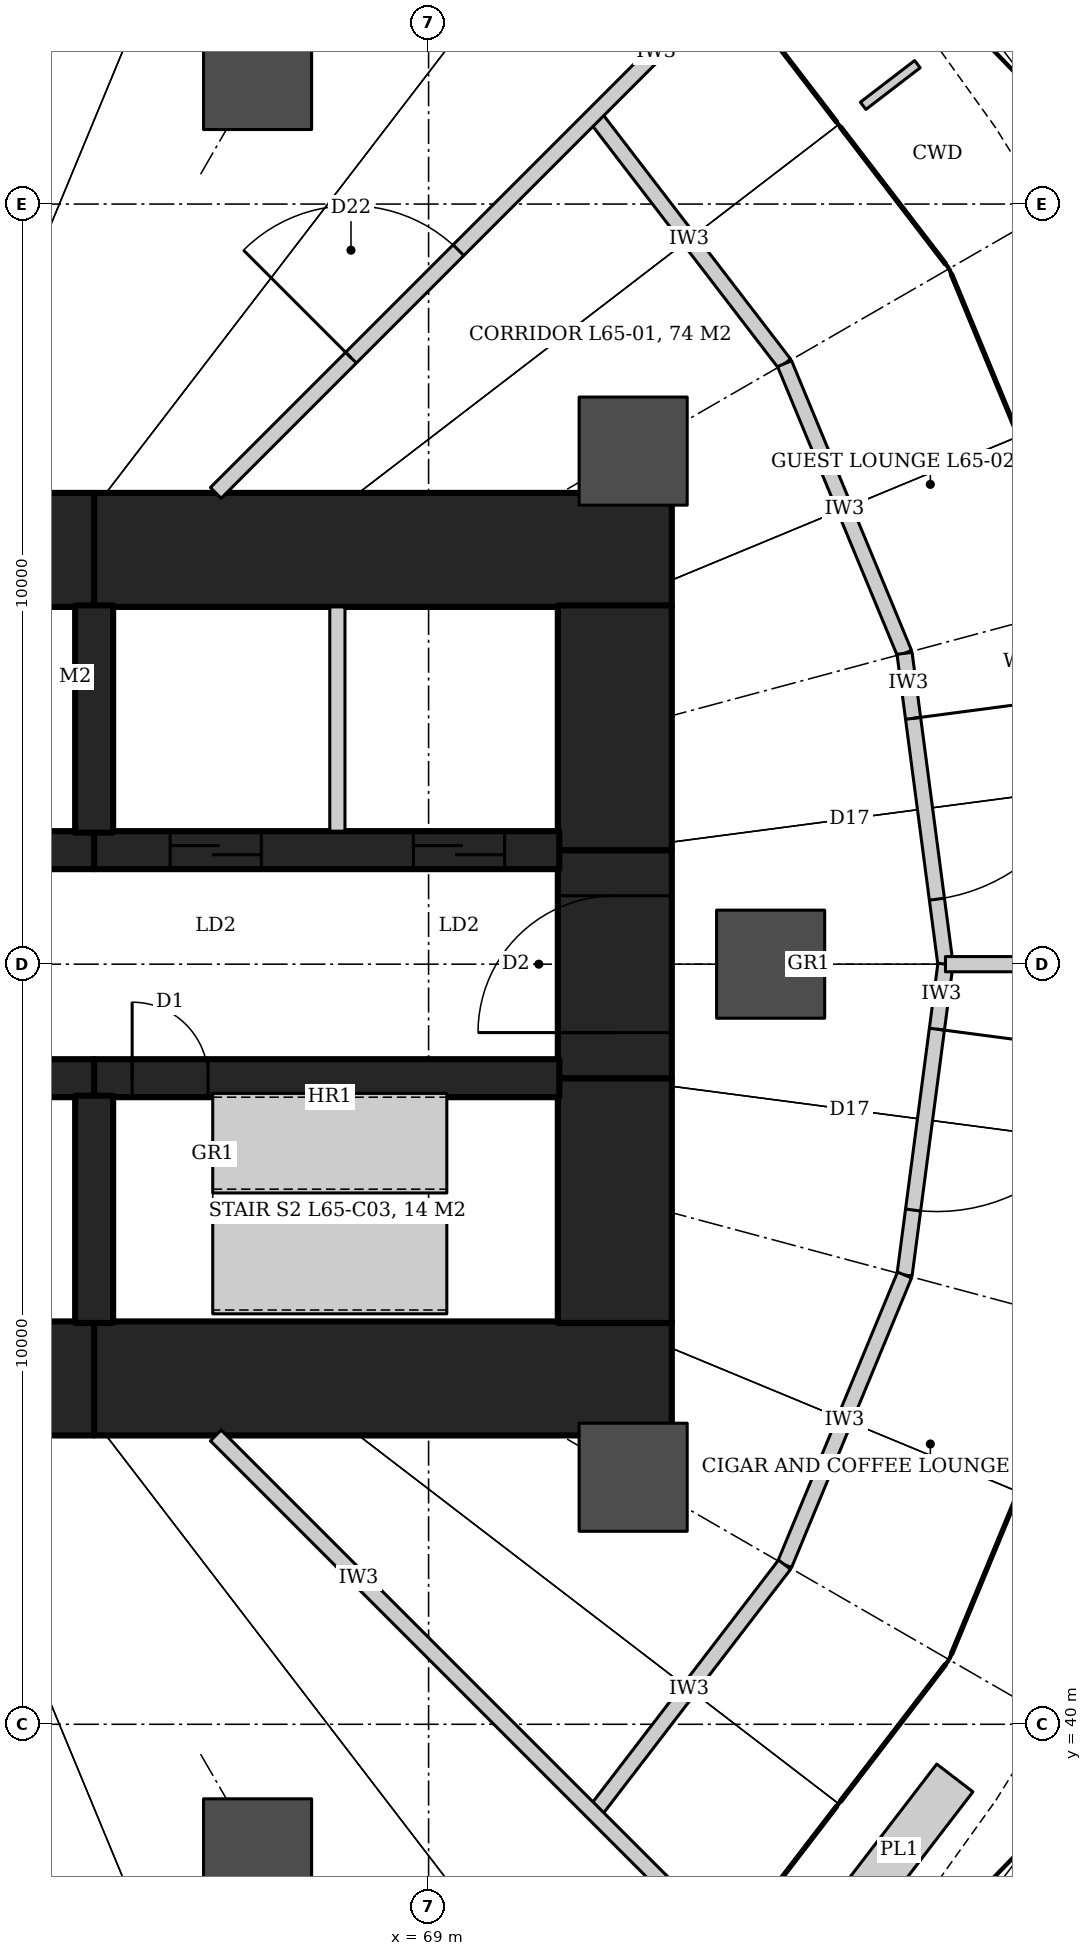
"""IFC4 building model, lengths in metres.
Left out: names, types, materials, properties, quantities, classifications, styles, units other than length and angle.
Written with IfcOpenShell. Run it as: python <this file> out.ifc"""

import sys

from ifc_helpers import new_model, si_unit, direction, frame, frame_2d, origin, origin_2d, place, context, subcontext, project, spatial, rectangle, hollow_circle, extrude, element, fill, save


model = new_model("IFC4")
c1 = context("Model", 3, precision=1e-05, world=origin(), true_north=direction((0.0, 1.0)))
c2 = subcontext(c1, "Body", "Model", "MODEL_VIEW")
j1 = project(units=[si_unit("LENGTHUNIT", "METRE"), si_unit("PLANEANGLEUNIT", "RADIAN")], contexts=[c1])
p1 = place(None, origin())
s1 = spatial("IfcSite", under=j1, at=p1, CompositionType="ELEMENT")
p2 = place(p1, origin())
s2 = spatial("IfcBuilding", under=s1, at=p2, CompositionType="ELEMENT")
p3 = place(p2, frame((0.0, 0.0, 278.0)))
s3 = spatial("IfcBuildingStorey", under=s2, at=p3, CompositionType="ELEMENT", Elevation=278.0)
p4 = place(p3, frame((55.4, 55.45, 0.0), z_axis=(0.0, 0.0, 1.0), x_axis=(1.0, 0.0, 0.0)))
e1 = element("IfcWall", 1, at=p4, inside=s3, PredefinedType="SHEAR", context=c2, shape_type="SweptSolid", body=[
    extrude(rectangle(XDim=9.2, YDim=1.5, at=frame_2d((4.6, 0.0))), origin(), (0.0, 0.0, 1.0), 4.2),
])
p5 = place(p3, frame((64.6, 55.45, 0.0), z_axis=(0.0, 0.0, 1.0), x_axis=(1.0, 0.0, 0.0)))
e2 = element("IfcWall", 2, at=p5, inside=s3, PredefinedType="SHEAR", context=c2, shape_type="SweptSolid", body=[
    extrude(rectangle(XDim=7.6, YDim=1.5, at=frame_2d((3.8, 0.0))), origin(), (0.0, 0.0, 1.0), 4.2),
])
p6 = place(p3, frame((55.4, 44.55, 0.0), z_axis=(0.0, 0.0, 1.0), x_axis=(1.0, 0.0, 0.0)))
e3 = element("IfcWall", 3, at=p6, inside=s3, PredefinedType="SHEAR", context=c2, shape_type="SweptSolid", body=[
    extrude(rectangle(XDim=9.2, YDim=1.5, at=frame_2d((4.6, 0.0))), origin(), (0.0, 0.0, 1.0), 4.2),
])
p7 = place(p3, frame((64.6, 44.55, 0.0), z_axis=(0.0, 0.0, 1.0), x_axis=(1.0, 0.0, 0.0)))
e4 = element("IfcWall", 4, at=p7, inside=s3, PredefinedType="SHEAR", context=c2, shape_type="SweptSolid", body=[
    extrude(rectangle(XDim=7.6, YDim=1.5, at=frame_2d((3.8, 0.0))), origin(), (0.0, 0.0, 1.0), 4.2),
])
p8 = place(p3, frame((71.45, 45.28, 0.0), z_axis=(0.0, 0.0, 1.0), x_axis=(0.0, 1.0, 0.0)))
e5 = element("IfcWall", 5, at=p8, inside=s3, PredefinedType="SHEAR", context=c2, shape_type="SweptSolid", body=[
    extrude(rectangle(XDim=3.22, YDim=1.5, at=frame_2d((1.61, 0.0))), origin(), (0.0, 0.0, 1.0), 4.2),
])
p9 = place(p3, frame((71.45, 48.5, 0.0), z_axis=(0.0, 0.0, 1.0), x_axis=(0.0, 1.0, 0.0)))
e6 = element("IfcWall", 6, at=p9, inside=s3, PredefinedType="SHEAR", context=c2, shape_type="SweptSolid", body=[
    extrude(rectangle(XDim=3.0, YDim=1.5, at=frame_2d((1.5, 0.0))), origin(), (0.0, 0.0, 1.0), 4.2),
])
p10 = place(p9, frame((0.6, 0.0, 0.0)))
e7 = element("IfcOpeningElement", 7, at=p10, cuts=e6, PredefinedType="OPENING", context=c2, shape_type="SweptSolid", body=[
    extrude(rectangle(XDim=1.8, YDim=2.1, at=frame_2d((0.9, 1.05))), frame((0.0, 0.76, 0.0), z_axis=(0.0, -1.0, 0.0), x_axis=(1.0, 0.0, 0.0)), (0.0, 0.0, 1.0), 1.52),
])
p11 = place(p3, frame((71.45, 51.5, 0.0), z_axis=(0.0, 0.0, 1.0), x_axis=(0.0, 1.0, 0.0)))
e8 = element("IfcWall", 8, at=p11, inside=s3, PredefinedType="SHEAR", context=c2, shape_type="SweptSolid", body=[
    extrude(rectangle(XDim=3.22, YDim=1.5, at=frame_2d((1.61, 0.0))), origin(), (0.0, 0.0, 1.0), 4.2),
])
p12 = place(p3, frame((55.4, 51.5, 0.0), z_axis=(0.0, 0.0, 1.0), x_axis=(1.0, 0.0, 0.0)))
e9 = element("IfcWall", 9, at=p12, inside=s3, PredefinedType="SHEAR", context=c2, shape_type="SweptSolid", body=[
    extrude(rectangle(XDim=9.2, YDim=0.5, at=frame_2d((4.6, 0.0))), origin(), (0.0, 0.0, 1.0), 4.2),
])
p13 = place(p12, frame((1.036, 0.0, 0.0)))
e10 = element("IfcOpeningElement", 10, at=p13, cuts=e9, PredefinedType="OPENING", context=c2, shape_type="SweptSolid", body=[
    extrude(rectangle(XDim=0.8, YDim=2.1, at=frame_2d((0.4, 1.05))), frame((0.0, 0.26, 0.0), z_axis=(0.0, -1.0, 0.0), x_axis=(1.0, 0.0, 0.0)), (0.0, 0.0, 1.0), 0.52),
])
p14 = place(p12, frame((3.409, 0.0, 0.0)))
e11 = element("IfcOpeningElement", 11, at=p14, cuts=e9, PredefinedType="OPENING", context=c2, shape_type="SweptSolid", body=[
    extrude(rectangle(XDim=0.8, YDim=2.1, at=frame_2d((0.4, 1.05))), frame((0.0, 0.26, 0.0), z_axis=(0.0, -1.0, 0.0), x_axis=(1.0, 0.0, 0.0)), (0.0, 0.0, 1.0), 0.52),
])
p15 = place(p12, frame((6.573, 0.0, 0.0)))
e12 = element("IfcOpeningElement", 12, at=p15, cuts=e9, PredefinedType="OPENING", context=c2, shape_type="SweptSolid", body=[
    extrude(rectangle(XDim=0.8, YDim=2.1, at=frame_2d((0.4, 1.05))), frame((0.0, 0.26, 0.0), z_axis=(0.0, -1.0, 0.0), x_axis=(1.0, 0.0, 0.0)), (0.0, 0.0, 1.0), 0.52),
])
p16 = place(p3, frame((64.6, 51.5, 0.0), z_axis=(0.0, 0.0, 1.0), x_axis=(1.0, 0.0, 0.0)))
e13 = element("IfcWall", 13, at=p16, inside=s3, PredefinedType="SHEAR", context=c2, shape_type="SweptSolid", body=[
    extrude(rectangle(XDim=6.12, YDim=0.5, at=frame_2d((3.06, 0.0))), origin(), (0.0, 0.0, 1.0), 4.2),
])
p17 = place(p16, frame((1.0, 0.0, 0.0)))
e14 = element("IfcOpeningElement", 14, at=p17, cuts=e13, PredefinedType="OPENING", context=c2, shape_type="SweptSolid", body=[
    extrude(rectangle(XDim=1.2, YDim=2.1, at=frame_2d((0.6, 1.05))), frame((0.0, 0.26, 0.0), z_axis=(0.0, -1.0, 0.0), x_axis=(1.0, 0.0, 0.0)), (0.0, 0.0, 1.0), 0.52),
])
p18 = place(p16, frame((4.2, 0.0, 0.0)))
e15 = element("IfcOpeningElement", 15, at=p18, cuts=e13, PredefinedType="OPENING", context=c2, shape_type="SweptSolid", body=[
    extrude(rectangle(XDim=1.2, YDim=2.1, at=frame_2d((0.6, 1.05))), frame((0.0, 0.26, 0.0), z_axis=(0.0, -1.0, 0.0), x_axis=(1.0, 0.0, 0.0)), (0.0, 0.0, 1.0), 0.52),
])
p19 = place(p3, frame((55.4, 48.5, 0.0), z_axis=(0.0, 0.0, 1.0), x_axis=(1.0, 0.0, 0.0)))
e16 = element("IfcWall", 16, at=p19, inside=s3, PredefinedType="SHEAR", context=c2, shape_type="SweptSolid", body=[
    extrude(rectangle(XDim=9.2, YDim=0.5, at=frame_2d((4.6, 0.0))), origin(), (0.0, 0.0, 1.0), 4.2),
])
p20 = place(p19, frame((0.6, 0.0, 0.0)))
e17 = element("IfcOpeningElement", 17, at=p20, cuts=e16, PredefinedType="OPENING", context=c2, shape_type="SweptSolid", body=[
    extrude(rectangle(XDim=1.1, YDim=2.1, at=frame_2d((0.55, 1.05))), frame((0.0, 0.26, 0.0), z_axis=(0.0, -1.0, 0.0), x_axis=(1.0, 0.0, 0.0)), (0.0, 0.0, 1.0), 0.52),
])
p21 = place(p19, frame((2.9, 0.0, 0.0)))
e18 = element("IfcOpeningElement", 18, at=p21, cuts=e16, PredefinedType="OPENING", context=c2, shape_type="SweptSolid", body=[
    extrude(rectangle(XDim=1.1, YDim=2.1, at=frame_2d((0.55, 1.05))), frame((0.0, 0.26, 0.0), z_axis=(0.0, -1.0, 0.0), x_axis=(1.0, 0.0, 0.0)), (0.0, 0.0, 1.0), 0.52),
])
p22 = place(p19, frame((5.2, 0.0, 0.0)))
e19 = element("IfcOpeningElement", 19, at=p22, cuts=e16, PredefinedType="OPENING", context=c2, shape_type="SweptSolid", body=[
    extrude(rectangle(XDim=1.1, YDim=2.1, at=frame_2d((0.55, 1.05))), frame((0.0, 0.26, 0.0), z_axis=(0.0, -1.0, 0.0), x_axis=(1.0, 0.0, 0.0)), (0.0, 0.0, 1.0), 0.52),
])
p23 = place(p19, frame((7.5, 0.0, 0.0)))
e20 = element("IfcOpeningElement", 20, at=p23, cuts=e16, PredefinedType="OPENING", context=c2, shape_type="SweptSolid", body=[
    extrude(rectangle(XDim=1.1, YDim=2.1, at=frame_2d((0.55, 1.05))), frame((0.0, 0.26, 0.0), z_axis=(0.0, -1.0, 0.0), x_axis=(1.0, 0.0, 0.0)), (0.0, 0.0, 1.0), 0.52),
])
p24 = place(p3, frame((64.6, 48.5, 0.0), z_axis=(0.0, 0.0, 1.0), x_axis=(1.0, 0.0, 0.0)))
e21 = element("IfcWall", 21, at=p24, inside=s3, PredefinedType="SHEAR", context=c2, shape_type="SweptSolid", body=[
    extrude(rectangle(XDim=6.12, YDim=0.5, at=frame_2d((3.06, 0.0))), origin(), (0.0, 0.0, 1.0), 4.2),
])
p25 = place(p24, frame((0.5, 0.0, 0.0)))
e22 = element("IfcOpeningElement", 22, at=p25, cuts=e21, PredefinedType="OPENING", context=c2, shape_type="SweptSolid", body=[
    extrude(rectangle(XDim=1.0, YDim=2.1, at=frame_2d((0.5, 1.05))), frame((0.0, 0.26, 0.0), z_axis=(0.0, -1.0, 0.0), x_axis=(1.0, 0.0, 0.0)), (0.0, 0.0, 1.0), 0.52),
])
for number, where, z_axis, x_axis in (
    (23, (64.6, 51.73, 0.0), (0.0, 0.0, 1.0), (0.0, 1.0, 0.0)),
    (24, (64.6, 48.27, 0.0), (0.0, 0.0, 1.0), (0.0, -1.0, 0.0)),
):
    element("IfcWall", number, at=place(p3, frame(where, z_axis=z_axis, x_axis=x_axis)), inside=s3, PredefinedType="SHEAR", context=c2, shape_type="SweptSolid", body=[
        extrude(rectangle(XDim=2.99, YDim=0.5, at=frame_2d((1.495, 0.0))), origin(), (0.0, 0.0, 1.0), 4.2),
    ])
for number, where, z_axis, x_axis in (
    (25, (73.5, 50.0, 0.0), (0.0, 0.0, 1.0), (1.0, 0.0, 0.0)),
    (26, (71.691, 56.75, 0.0), (0.0, 0.0, 1.0), (1.0, 0.0, 0.0)),
    (27, (66.75, 61.691, 0.0), (0.0, 0.0, 1.0), (1.0, 0.0, 0.0)),
    (28, (66.75, 38.309, 0.0), (0.0, 0.0, 1.0), (1.0, 0.0, 0.0)),
    (29, (71.691, 43.25, 0.0), (0.0, 0.0, 1.0), (1.0, 0.0, 0.0)),
):
    element("IfcColumn", number, at=place(p3, frame(where, z_axis=z_axis, x_axis=x_axis)), inside=s3, PredefinedType="COLUMN", context=c2, shape_type="SweptSolid", body=[
        extrude(hollow_circle(Radius=0.711, WallThickness=0.07, at=origin_2d()), origin(), (0.0, 0.0, 1.0), 4.2),
    ])
p26 = place(p3, frame((71.172, 61.172, 0.0), z_axis=(0.0, 0.0, 1.0), x_axis=(0.608714823874, -0.793389099494, 0.0)))
e30 = element("IfcWall", 30, at=p26, inside=s3, PredefinedType="PARTITIONING", context=c2, shape_type="SweptSolid", body=[
    extrude(rectangle(XDim=4.125, YDim=0.2, at=frame_2d((2.062, 0.0))), origin(), (0.0, 0.0, 1.0), 3.02),
])
p27 = place(p3, frame((73.683, 57.9, 0.0), z_axis=(0.0, 0.0, 1.0), x_axis=(0.382731667114, -0.923859551549, 0.0)))
e31 = element("IfcWall", 31, at=p27, inside=s3, PredefinedType="PARTITIONING", context=c2, shape_type="SweptSolid", body=[
    extrude(rectangle(XDim=4.125, YDim=0.2, at=frame_2d((2.062, 0.0))), origin(), (0.0, 0.0, 1.0), 3.02),
])
p28 = place(p3, frame((75.262, 54.089, 0.0), z_axis=(0.0, 0.0, 1.0), x_axis=(0.130515758099, -0.991446234996, 0.0)))
e32 = element("IfcWall", 32, at=p28, inside=s3, PredefinedType="PARTITIONING", context=c2, shape_type="SweptSolid", body=[
    extrude(rectangle(XDim=4.125, YDim=0.2, at=frame_2d((2.062, 0.0))), origin(), (0.0, 0.0, 1.0), 3.02),
])
p29 = place(p28, frame((0.862, 0.0, 0.0)))
e33 = element("IfcOpeningElement", 33, at=p29, cuts=e32, PredefinedType="OPENING", context=c2, shape_type="SweptSolid", body=[
    extrude(rectangle(XDim=2.4, YDim=2.4, at=frame_2d((1.2, 1.2))), frame((0.0, 0.11, 0.0), z_axis=(0.0, -1.0, 0.0), x_axis=(1.0, 0.0, 0.0)), (0.0, 0.0, 1.0), 0.22),
])
p30 = place(p3, frame((75.8, 50.0, 0.0), z_axis=(0.0, 0.0, 1.0), x_axis=(-0.130515758099, -0.991446234996, 0.0)))
e34 = element("IfcWall", 34, at=p30, inside=s3, PredefinedType="PARTITIONING", context=c2, shape_type="SweptSolid", body=[
    extrude(rectangle(XDim=4.125, YDim=0.2, at=frame_2d((2.062, 0.0))), origin(), (0.0, 0.0, 1.0), 3.02),
])
p31 = place(p30, frame((0.862, 0.0, 0.0)))
e35 = element("IfcOpeningElement", 35, at=p31, cuts=e34, PredefinedType="OPENING", context=c2, shape_type="SweptSolid", body=[
    extrude(rectangle(XDim=2.4, YDim=2.4, at=frame_2d((1.2, 1.2))), frame((0.0, 0.11, 0.0), z_axis=(0.0, -1.0, 0.0), x_axis=(1.0, 0.0, 0.0)), (0.0, 0.0, 1.0), 0.22),
])
p32 = place(p3, frame((75.262, 45.911, 0.0), z_axis=(0.0, 0.0, 1.0), x_axis=(-0.382731667114, -0.923859551549, 0.0)))
e36 = element("IfcWall", 36, at=p32, inside=s3, PredefinedType="PARTITIONING", context=c2, shape_type="SweptSolid", body=[
    extrude(rectangle(XDim=4.125, YDim=0.2, at=frame_2d((2.062, 0.0))), origin(), (0.0, 0.0, 1.0), 3.02),
])
p33 = place(p3, frame((73.683, 42.1, 0.0), z_axis=(0.0, 0.0, 1.0), x_axis=(-0.608714823874, -0.793389099494, 0.0)))
e37 = element("IfcWall", 37, at=p33, inside=s3, PredefinedType="PARTITIONING", context=c2, shape_type="SweptSolid", body=[
    extrude(rectangle(XDim=4.125, YDim=0.2, at=frame_2d((2.062, 0.0))), origin(), (0.0, 0.0, 1.0), 3.02),
])
p34 = place(p3, frame((75.8, 50.0, 0.0), z_axis=(0.0, 0.0, 1.0), x_axis=(1.0, 0.0, 0.0)))
e38 = element("IfcWall", 38, at=p34, inside=s3, PredefinedType="PARTITIONING", context=c2, shape_type="SweptSolid", body=[
    extrude(rectangle(XDim=2.56, YDim=0.2, at=frame_2d((1.28, 0.0))), origin(), (0.0, 0.0, 1.0), 3.02),
])
p35 = place(p3, frame((66.2, 56.2, 0.0), z_axis=(0.0, 0.0, 1.0), x_axis=(0.707106781187, 0.707106781187, 0.0)))
e39 = element("IfcWall", 39, at=p35, inside=s3, PredefinedType="PARTITIONING", context=c2, shape_type="SweptSolid", body=[
    extrude(rectangle(XDim=9.692, YDim=0.2, at=frame_2d((4.846, 0.0))), origin(), (0.0, 0.0, 1.0), 3.02),
])
p36 = place(p35, frame((2.516, 0.0, 0.0)))
e40 = element("IfcOpeningElement", 40, at=p36, cuts=e39, PredefinedType="OPENING", context=c2, shape_type="SweptSolid", body=[
    extrude(rectangle(XDim=2.0, YDim=2.7, at=frame_2d((1.0, 1.35))), frame((0.0, 0.11, 0.0), z_axis=(0.0, -1.0, 0.0), x_axis=(1.0, 0.0, 0.0)), (0.0, 0.0, 1.0), 0.22),
])
p37 = place(p3, frame((66.2, 43.8, 0.0), z_axis=(0.0, 0.0, 1.0), x_axis=(0.707106781187, -0.707106781187, 0.0)))
e41 = element("IfcWall", 41, at=p37, inside=s3, PredefinedType="PARTITIONING", context=c2, shape_type="SweptSolid", body=[
    extrude(rectangle(XDim=9.692, YDim=0.2, at=frame_2d((4.846, 0.0))), origin(), (0.0, 0.0, 1.0), 3.02),
])
p38 = place(p3, frame((67.8, 51.75, 0.0), z_axis=(0.0, 0.0, 1.0), x_axis=(0.0, 1.0, 0.0)))
e42 = element("IfcWall", 42, at=p38, inside=s3, PredefinedType="PARTITIONING", context=c2, shape_type="SweptSolid", body=[
    extrude(rectangle(XDim=2.95, YDim=0.2, at=frame_2d((1.475, 0.0))), origin(), (0.0, 0.0, 1.0), 4.2),
])
p39 = place(p29, origin())
e43 = element("IfcDoor", 43, at=p39, inside=s3, OperationType="DOUBLE_DOOR_DOUBLE_SWING", PredefinedType="DOOR", context=c2, shape_type="SweptSolid", body=[
    extrude(rectangle(XDim=2.4, YDim=2.4, at=frame_2d((1.2, 1.2))), frame((0.0, 0.025, 0.0), z_axis=(0.0, -1.0, 0.0), x_axis=(1.0, 0.0, 0.0)), (0.0, 0.0, 1.0), 0.05),
])
fill(e33, e43)
p40 = place(p36, origin())
e44 = element("IfcDoor", 44, at=p40, inside=s3, OperationType="DOUBLE_DOOR_DOUBLE_SWING", PredefinedType="DOOR", context=c2, shape_type="SweptSolid", body=[
    extrude(rectangle(XDim=2.0, YDim=2.7, at=frame_2d((1.0, 1.35))), frame((0.0, 0.025, 0.0), z_axis=(0.0, -1.0, 0.0), x_axis=(1.0, 0.0, 0.0)), (0.0, 0.0, 1.0), 0.05),
])
fill(e40, e44)
p41 = place(p31, origin())
e45 = element("IfcDoor", 45, at=p41, inside=s3, OperationType="DOUBLE_DOOR_DOUBLE_SWING", PredefinedType="DOOR", context=c2, shape_type="SweptSolid", body=[
    extrude(rectangle(XDim=2.4, YDim=2.4, at=frame_2d((1.2, 1.2))), frame((0.0, 0.025, 0.0), z_axis=(0.0, -1.0, 0.0), x_axis=(1.0, 0.0, 0.0)), (0.0, 0.0, 1.0), 0.05),
])
fill(e35, e45)
p42 = place(p25, origin())
e46 = element("IfcDoor", 46, at=p42, inside=s3, OperationType="SINGLE_SWING_LEFT", PredefinedType="DOOR", context=c2, shape_type="SweptSolid", body=[
    extrude(rectangle(XDim=1.0, YDim=2.1, at=frame_2d((0.5, 1.05))), frame((0.0, 0.025, 0.0), z_axis=(0.0, -1.0, 0.0), x_axis=(1.0, 0.0, 0.0)), (0.0, 0.0, 1.0), 0.05),
])
fill(e22, e46)
p43 = place(p17, origin())
e47 = element("IfcDoor", 47, at=p43, inside=s3, OperationType="SLIDING_TO_LEFT", PredefinedType="DOOR", context=c2, shape_type="SweptSolid", body=[
    extrude(rectangle(XDim=1.2, YDim=2.1, at=frame_2d((0.6, 1.05))), frame((0.0, 0.025, 0.0), z_axis=(0.0, -1.0, 0.0), x_axis=(1.0, 0.0, 0.0)), (0.0, 0.0, 1.0), 0.05),
])
fill(e14, e47)
p44 = place(p18, origin())
e48 = element("IfcDoor", 48, at=p44, inside=s3, OperationType="SLIDING_TO_LEFT", PredefinedType="DOOR", context=c2, shape_type="SweptSolid", body=[
    extrude(rectangle(XDim=1.2, YDim=2.1, at=frame_2d((0.6, 1.05))), frame((0.0, 0.025, 0.0), z_axis=(0.0, -1.0, 0.0), x_axis=(1.0, 0.0, 0.0)), (0.0, 0.0, 1.0), 0.05),
])
fill(e15, e48)
p45 = place(p10, origin())
e49 = element("IfcDoor", 49, at=p45, inside=s3, OperationType="DOUBLE_DOOR_DOUBLE_SWING", PredefinedType="DOOR", context=c2, shape_type="SweptSolid", body=[
    extrude(rectangle(XDim=1.8, YDim=2.1, at=frame_2d((0.9, 1.05))), frame((0.0, 0.025, 0.0), z_axis=(0.0, -1.0, 0.0), x_axis=(1.0, 0.0, 0.0)), (0.0, 0.0, 1.0), 0.05),
])
fill(e7, e49)
save(model, sys.argv[1])
